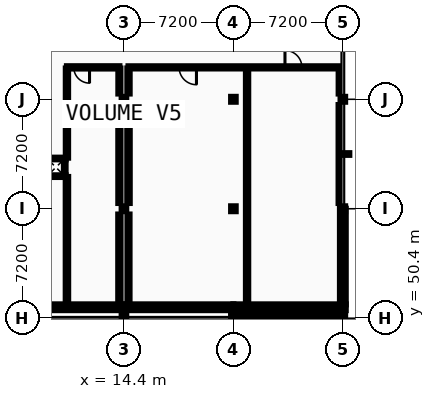
"""IFC4 building model, lengths in metres.
Left out: names, types, materials, properties, quantities, classifications, styles, units other than length and angle.
Written with IfcOpenShell. Run it as: python <this file> out.ifc"""

import sys

from ifc_helpers import new_model, si_unit, direction, frame, frame_2d, origin, origin_2d, place, context, subcontext, project, spatial, rectangle, i_section, extrude, element, fill, save


model = new_model("IFC4")
c1 = context("Model", 3, precision=1e-05, world=origin(), true_north=direction((0.0, 1.0)))
c2 = subcontext(c1, "Body", "Model", "MODEL_VIEW")
j1 = project(units=[si_unit("LENGTHUNIT", "METRE"), si_unit("PLANEANGLEUNIT", "RADIAN")], contexts=[c1])
p1 = place(None, origin())
s1 = spatial("IfcSite", under=j1, at=p1, CompositionType="ELEMENT")
p2 = place(p1, origin())
s2 = spatial("IfcBuilding", under=s1, at=p2, CompositionType="ELEMENT")
p3 = place(p2, frame((0.0, 0.0, 9.6)))
s3 = spatial("IfcBuildingStorey", under=s2, at=p3, CompositionType="ELEMENT", Elevation=9.6)
p4 = place(p3, frame((14.4, 50.4, 0.0), z_axis=(0.0, 0.0, 1.0), x_axis=(1.0, 0.0, 0.0)))
e1 = element("IfcColumn", 1, at=p4, inside=s3, PredefinedType="COLUMN", context=c2, shape_type="SweptSolid", body=[
    extrude(i_section(OverallWidth=0.3, OverallDepth=0.36, WebThickness=0.012, FlangeThickness=0.022, FilletRadius=0.027, at=origin_2d()), origin(), (0.0, 0.0, 1.0), 4.4),
])
p5 = place(p3, frame((14.4, 51.12, 0.0), z_axis=(0.0, 0.0, 1.0), x_axis=(1.0, 0.0, 0.0)))
e2 = element("IfcColumn", 2, at=p5, inside=s3, PredefinedType="COLUMN", context=c2, shape_type="SweptSolid", body=[
    extrude(i_section(OverallWidth=0.24, OverallDepth=0.24, WebThickness=0.01, FlangeThickness=0.017, FilletRadius=0.021, at=origin_2d()), origin(), (0.0, 0.0, 1.0), 4.4),
])
for number, where, z_axis, x_axis in (
    (3, (14.4, 57.6, 0.0), (0.0, 0.0, 1.0), (1.0, 0.0, 0.0)),
    (4, (14.4, 64.8, 0.0), (0.0, 0.0, 1.0), (1.0, 0.0, 0.0)),
):
    element("IfcColumn", number, at=place(p3, frame(where, z_axis=z_axis, x_axis=x_axis)), inside=s3, PredefinedType="COLUMN", context=c2, shape_type="SweptSolid", body=[
        extrude(i_section(OverallWidth=0.3, OverallDepth=0.32, WebThickness=0.011, FlangeThickness=0.021, FilletRadius=0.027, at=origin_2d()), origin(), (0.0, 0.0, 1.0), 4.4),
    ])
p6 = place(p3, frame((21.6, 50.4, 0.0), z_axis=(0.0, 0.0, 1.0), x_axis=(1.0, 0.0, 0.0)))
e5 = element("IfcColumn", 5, at=p6, inside=s3, PredefinedType="COLUMN", context=c2, shape_type="SweptSolid", body=[
    extrude(i_section(OverallWidth=0.3, OverallDepth=0.36, WebThickness=0.012, FlangeThickness=0.022, FilletRadius=0.027, at=origin_2d()), origin(), (0.0, 0.0, 1.0), 4.4),
])
p7 = place(p3, frame((21.6, 51.12, 0.0), z_axis=(0.0, 0.0, 1.0), x_axis=(1.0, 0.0, 0.0)))
e6 = element("IfcColumn", 6, at=p7, inside=s3, PredefinedType="COLUMN", context=c2, shape_type="SweptSolid", body=[
    extrude(i_section(OverallWidth=0.24, OverallDepth=0.24, WebThickness=0.01, FlangeThickness=0.017, FilletRadius=0.021, at=origin_2d()), origin(), (0.0, 0.0, 1.0), 4.4),
])
for number, where, z_axis, x_axis in (
    (7, (21.6, 57.6, 0.0), (0.0, 0.0, 1.0), (1.0, 0.0, 0.0)),
    (8, (21.6, 64.8, 0.0), (0.0, 0.0, 1.0), (1.0, 0.0, 0.0)),
):
    element("IfcColumn", number, at=place(p3, frame(where, z_axis=z_axis, x_axis=x_axis)), inside=s3, PredefinedType="COLUMN", context=c2, shape_type="SweptSolid", body=[
        extrude(i_section(OverallWidth=0.3, OverallDepth=0.32, WebThickness=0.011, FlangeThickness=0.021, FilletRadius=0.027, at=origin_2d()), origin(), (0.0, 0.0, 1.0), 4.4),
    ])
p8 = place(p3, frame((28.8, 50.4, 0.0), z_axis=(0.0, 0.0, 1.0), x_axis=(1.0, 0.0, 0.0)))
e9 = element("IfcColumn", 9, at=p8, inside=s3, PredefinedType="COLUMN", context=c2, shape_type="SweptSolid", body=[
    extrude(i_section(OverallWidth=0.3, OverallDepth=0.36, WebThickness=0.012, FlangeThickness=0.022, FilletRadius=0.027, at=origin_2d()), origin(), (0.0, 0.0, 1.0), 4.4),
])
p9 = place(p3, frame((28.8, 51.12, 0.0), z_axis=(0.0, 0.0, 1.0), x_axis=(1.0, 0.0, 0.0)))
e10 = element("IfcColumn", 10, at=p9, inside=s3, PredefinedType="COLUMN", context=c2, shape_type="SweptSolid", body=[
    extrude(i_section(OverallWidth=0.24, OverallDepth=0.24, WebThickness=0.01, FlangeThickness=0.017, FilletRadius=0.021, at=origin_2d()), origin(), (0.0, 0.0, 1.0), 4.4),
])
for number, where, z_axis, x_axis in (
    (11, (28.8, 57.6, 0.0), (0.0, 0.0, 1.0), (1.0, 0.0, 0.0)),
    (12, (28.8, 64.8, 0.0), (0.0, 0.0, 1.0), (1.0, 0.0, 0.0)),
):
    element("IfcColumn", number, at=place(p3, frame(where, z_axis=z_axis, x_axis=x_axis)), inside=s3, PredefinedType="COLUMN", context=c2, shape_type="SweptSolid", body=[
        extrude(i_section(OverallWidth=0.3, OverallDepth=0.32, WebThickness=0.011, FlangeThickness=0.021, FilletRadius=0.027, at=origin_2d()), origin(), (0.0, 0.0, 1.0), 4.4),
    ])
p10 = place(p3, frame((28.8, 50.4, 0.0), z_axis=(0.0, 0.0, 1.0), x_axis=(-1.0, 0.0, 0.0)))
e13 = element("IfcWall", 13, at=p10, inside=s3, PredefinedType="STANDARD", context=c2, shape_type="SweptSolid", body=[
    extrude(rectangle(XDim=7.31, YDim=0.38, at=frame_2d((3.655, 0.0))), origin(), (0.0, 0.0, 1.0), 3.895),
])
p11 = place(p10, frame((1.576, 0.0, 0.95)))
e14 = element("IfcOpeningElement", 14, at=p11, cuts=e13, PredefinedType="OPENING", context=c2, shape_type="SweptSolid", body=[
    extrude(rectangle(XDim=1.234, YDim=1.296, at=frame_2d((0.617, 0.648))), frame((0.0, 0.2, 0.0), z_axis=(0.0, -1.0, 0.0), x_axis=(1.0, 0.0, 0.0)), (0.0, 0.0, 1.0), 0.4),
])
p12 = place(p3, frame((7.2, 51.12, 0.0), z_axis=(0.0, 0.0, 1.0), x_axis=(1.0, 0.0, 0.0)))
e15 = element("IfcWall", 15, at=p12, inside=s3, PredefinedType="STANDARD", context=c2, shape_type="SweptSolid", body=[
    extrude(rectangle(XDim=7.2, YDim=0.38, at=frame_2d((3.6, 0.0))), origin(), (0.0, 0.0, 1.0), 3.875),
])
p13 = place(p12, frame((4.474, 0.0, 0.95)))
e16 = element("IfcOpeningElement", 16, at=p13, cuts=e15, PredefinedType="OPENING", context=c2, shape_type="SweptSolid", body=[
    extrude(rectangle(XDim=1.132, YDim=1.26, at=frame_2d((0.566, 0.63))), frame((0.0, 0.2, 0.0), z_axis=(0.0, -1.0, 0.0), x_axis=(1.0, 0.0, 0.0)), (0.0, 0.0, 1.0), 0.4),
])
p14 = place(p3, frame((14.4, 51.12, 0.0), z_axis=(0.0, 0.0, 1.0), x_axis=(1.0, 0.0, 0.0)))
e17 = element("IfcWall", 17, at=p14, inside=s3, PredefinedType="STANDARD", context=c2, shape_type="SweptSolid", body=[
    extrude(rectangle(XDim=7.2, YDim=0.38, at=frame_2d((3.6, 0.0))), origin(), (0.0, 0.0, 1.0), 3.875),
])
p15 = place(p14, frame((1.577, 0.0, 0.95)))
e18 = element("IfcOpeningElement", 18, at=p15, cuts=e17, PredefinedType="OPENING", context=c2, shape_type="SweptSolid", body=[
    extrude(rectangle(XDim=1.166, YDim=1.26, at=frame_2d((0.583, 0.63))), frame((0.0, 0.2, 0.0), z_axis=(0.0, -1.0, 0.0), x_axis=(1.0, 0.0, 0.0)), (0.0, 0.0, 1.0), 0.4),
])
p16 = place(p3, frame((21.6, 51.12, 0.0), z_axis=(0.0, 0.0, 1.0), x_axis=(1.0, 0.0, 0.0)))
e19 = element("IfcWall", 19, at=p16, inside=s3, PredefinedType="STANDARD", context=c2, shape_type="SweptSolid", body=[
    extrude(rectangle(XDim=7.39, YDim=0.38, at=frame_2d((3.695, 0.0))), origin(), (0.0, 0.0, 1.0), 3.875),
])
p17 = place(p16, frame((1.617, 0.0, 0.95)))
e20 = element("IfcOpeningElement", 20, at=p17, cuts=e19, PredefinedType="OPENING", context=c2, shape_type="SweptSolid", body=[
    extrude(rectangle(XDim=1.2, YDim=1.26, at=frame_2d((0.6, 0.63))), frame((0.0, 0.2, 0.0), z_axis=(0.0, -1.0, 0.0), x_axis=(1.0, 0.0, 0.0)), (0.0, 0.0, 1.0), 0.4),
])
p18 = place(p16, frame((4.573, 0.0, 0.95)))
e21 = element("IfcOpeningElement", 21, at=p18, cuts=e19, PredefinedType="OPENING", context=c2, shape_type="SweptSolid", body=[
    extrude(rectangle(XDim=1.2, YDim=1.26, at=frame_2d((0.6, 0.63))), frame((0.0, 0.2, 0.0), z_axis=(0.0, -1.0, 0.0), x_axis=(1.0, 0.0, 0.0)), (0.0, 0.0, 1.0), 0.4),
])
p19 = place(p3, frame((28.8, 51.31, 0.0), z_axis=(0.0, 0.0, 1.0), x_axis=(0.0, 1.0, 0.0)))
e22 = element("IfcWall", 22, at=p19, inside=s3, PredefinedType="STANDARD", context=c2, shape_type="SweptSolid", body=[
    extrude(rectangle(XDim=6.29, YDim=0.38, at=frame_2d((3.145, 0.0))), origin(), (0.0, 0.0, 1.0), 3.865),
])
p20 = place(p19, frame((2.613, 0.0, 0.95)))
e23 = element("IfcOpeningElement", 23, at=p20, cuts=e22, PredefinedType="OPENING", context=c2, shape_type="SweptSolid", body=[
    extrude(rectangle(XDim=1.064, YDim=1.296, at=frame_2d((0.532, 0.648))), frame((0.0, 0.2, 0.0), z_axis=(0.0, -1.0, 0.0), x_axis=(1.0, 0.0, 0.0)), (0.0, 0.0, 1.0), 0.4),
])
for number, where, z_axis, x_axis in (
    (24, (9.29, 59.745, 0.0), (0.0, 0.0, 1.0), (1.0, 0.0, 0.0)),
    (25, (9.29, 60.905, 0.0), (0.0, 0.0, 1.0), (1.0, 0.0, 0.0)),
):
    element("IfcWall", number, at=place(p3, frame(where, z_axis=z_axis, x_axis=x_axis)), inside=s3, PredefinedType="PARTITIONING", context=c2, shape_type="SweptSolid", body=[
        extrude(rectangle(XDim=1.27, YDim=0.11, at=frame_2d((0.635, 0.0))), origin(), (0.0, 0.0, 1.0), 4.2),
    ])
p21 = place(p3, frame((10.505, 59.8, 0.0), z_axis=(0.0, 0.0, 1.0), x_axis=(0.0, 1.0, 0.0)))
e26 = element("IfcWall", 26, at=p21, inside=s3, PredefinedType="PARTITIONING", context=c2, shape_type="SweptSolid", body=[
    extrude(rectangle(XDim=1.05, YDim=0.11, at=frame_2d((0.525, 0.0))), origin(), (0.0, 0.0, 1.0), 4.2),
])
p22 = place(p3, frame((10.65, 66.9, 0.0), z_axis=(0.0, 0.0, 1.0), x_axis=(1.0, 0.0, 0.0)))
e27 = element("IfcWall", 27, at=p22, inside=s3, PredefinedType="PARTITIONING", context=c2, shape_type="SweptSolid", body=[
    extrude(rectangle(XDim=3.45, YDim=0.15, at=frame_2d((1.725, 0.0))), origin(), (0.0, 0.0, 1.0), 4.2),
])
p23 = place(p22, frame((0.45, 0.0, 0.0)))
e28 = element("IfcOpeningElement", 28, at=p23, cuts=e27, PredefinedType="OPENING", context=c2, shape_type="SweptSolid", body=[
    extrude(rectangle(XDim=1.036, YDim=2.152, at=frame_2d((0.518, 1.076))), frame((0.0, 0.085, 0.0), z_axis=(0.0, -1.0, 0.0), x_axis=(1.0, 0.0, 0.0)), (0.0, 0.0, 1.0), 0.17),
])
p24 = place(p3, frame((14.7, 66.9, 0.0), z_axis=(0.0, 0.0, 1.0), x_axis=(1.0, 0.0, 0.0)))
e29 = element("IfcWall", 29, at=p24, inside=s3, PredefinedType="PARTITIONING", context=c2, shape_type="SweptSolid", body=[
    extrude(rectangle(XDim=13.9, YDim=0.142, at=frame_2d((6.95, 0.0))), origin(), (0.0, 0.0, 1.0), 4.2),
])
p25 = place(p24, frame((10.293, 0.0, 0.0)))
e30 = element("IfcOpeningElement", 30, at=p25, cuts=e29, PredefinedType="OPENING", context=c2, shape_type="SweptSolid", body=[
    extrude(rectangle(XDim=1.114, YDim=2.152, at=frame_2d((0.557, 1.076))), frame((0.0, 0.081, 0.0), z_axis=(0.0, -1.0, 0.0), x_axis=(1.0, 0.0, 0.0)), (0.0, 0.0, 1.0), 0.162),
])
p26 = place(p24, frame((3.33, 0.0, 0.0)))
e31 = element("IfcOpeningElement", 31, at=p26, cuts=e29, PredefinedType="OPENING", context=c2, shape_type="SweptSolid", body=[
    extrude(rectangle(XDim=1.14, YDim=2.152, at=frame_2d((0.57, 1.076))), frame((0.0, 0.081, 0.0), z_axis=(0.0, -1.0, 0.0), x_axis=(1.0, 0.0, 0.0)), (0.0, 0.0, 1.0), 0.162),
])
p27 = place(p3, frame((10.65, 51.32, 0.0), z_axis=(0.0, 0.0, 1.0), x_axis=(0.0, 1.0, 0.0)))
e32 = element("IfcWall", 32, at=p27, inside=s3, PredefinedType="PARTITIONING", context=c2, shape_type="SweptSolid", body=[
    extrude(rectangle(XDim=8.37, YDim=0.16, at=frame_2d((4.185, 0.0))), origin(), (0.0, 0.0, 1.0), 4.2),
])
p28 = place(p3, frame((10.65, 60.96, 0.0), z_axis=(0.0, 0.0, 1.0), x_axis=(0.0, 1.0, 0.0)))
e33 = element("IfcWall", 33, at=p28, inside=s3, PredefinedType="PARTITIONING", context=c2, shape_type="SweptSolid", body=[
    extrude(rectangle(XDim=5.865, YDim=0.15, at=frame_2d((2.933, 0.0))), origin(), (0.0, 0.0, 1.0), 4.2),
])
p29 = place(p3, frame((14.1, 51.5, 0.0), z_axis=(0.0, 0.0, 1.0), x_axis=(0.0, 1.0, 0.0)))
e34 = element("IfcWall", 34, at=p29, inside=s3, PredefinedType="PARTITIONING", context=c2, shape_type="SweptSolid", body=[
    extrude(rectangle(XDim=5.72, YDim=0.15, at=frame_2d((2.86, 0.0))), origin(), (0.0, 0.0, 1.0), 3.875),
])
p30 = place(p3, frame((14.1, 57.98, 0.0), z_axis=(0.0, 0.0, 1.0), x_axis=(0.0, 1.0, 0.0)))
e35 = element("IfcWall", 35, at=p30, inside=s3, PredefinedType="PARTITIONING", context=c2, shape_type="SweptSolid", body=[
    extrude(rectangle(XDim=6.44, YDim=0.142, at=frame_2d((3.22, 0.0))), origin(), (0.0, 0.0, 1.0), 3.895),
])
p31 = place(p3, frame((14.1, 65.18, 0.0), z_axis=(0.0, 0.0, 1.0), x_axis=(0.0, 1.0, 0.0)))
e36 = element("IfcWall", 36, at=p31, inside=s3, PredefinedType="PARTITIONING", context=c2, shape_type="SweptSolid", body=[
    extrude(rectangle(XDim=1.645, YDim=0.135, at=frame_2d((0.823, 0.0))), origin(), (0.0, 0.0, 1.0), 4.2),
])
p32 = place(p3, frame((14.7, 51.5, 0.0), z_axis=(0.0, 0.0, 1.0), x_axis=(0.0, 1.0, 0.0)))
e37 = element("IfcWall", 37, at=p32, inside=s3, PredefinedType="PARTITIONING", context=c2, shape_type="SweptSolid", body=[
    extrude(rectangle(XDim=5.72, YDim=0.135, at=frame_2d((2.86, 0.0))), origin(), (0.0, 0.0, 1.0), 4.2),
])
p33 = place(p3, frame((14.7, 57.98, 0.0), z_axis=(0.0, 0.0, 1.0), x_axis=(0.0, 1.0, 0.0)))
e38 = element("IfcWall", 38, at=p33, inside=s3, PredefinedType="PARTITIONING", context=c2, shape_type="SweptSolid", body=[
    extrude(rectangle(XDim=6.44, YDim=0.16, at=frame_2d((3.22, 0.0))), origin(), (0.0, 0.0, 1.0), 3.895),
])
p34 = place(p3, frame((14.7, 65.18, 0.0), z_axis=(0.0, 0.0, 1.0), x_axis=(0.0, 1.0, 0.0)))
e39 = element("IfcWall", 39, at=p34, inside=s3, PredefinedType="PARTITIONING", context=c2, shape_type="SweptSolid", body=[
    extrude(rectangle(XDim=1.649, YDim=0.15, at=frame_2d((0.825, 0.0))), origin(), (0.0, 0.0, 1.0), 3.895),
])
p35 = place(p3, frame((22.5, 51.32, 0.0), z_axis=(0.0, 0.0, 1.0), x_axis=(0.0, 1.0, 0.0)))
e40 = element("IfcWall", 40, at=p35, inside=s3, PredefinedType="PARTITIONING", context=c2, shape_type="SweptSolid", body=[
    extrude(rectangle(XDim=15.509, YDim=0.15, at=frame_2d((7.754, 0.0))), origin(), (0.0, 0.0, 1.0), 4.2),
])
p36 = place(p3, frame((28.6, 57.98, 0.0), z_axis=(0.0, 0.0, 1.0), x_axis=(0.0, 1.0, 0.0)))
e41 = element("IfcWall", 41, at=p36, inside=s3, PredefinedType="PARTITIONING", context=c2, shape_type="SweptSolid", body=[
    extrude(rectangle(XDim=6.44, YDim=0.16, at=frame_2d((3.22, 0.0))), origin(), (0.0, 0.0, 1.0), 3.885),
])
p37 = place(p3, frame((28.6, 65.18, 0.0), z_axis=(0.0, 0.0, 1.0), x_axis=(0.0, 1.0, 0.0)))
e42 = element("IfcWall", 42, at=p37, inside=s3, PredefinedType="PARTITIONING", context=c2, shape_type="SweptSolid", body=[
    extrude(rectangle(XDim=1.649, YDim=0.15, at=frame_2d((0.825, 0.0))), origin(), (0.0, 0.0, 1.0), 3.885),
])
p38 = place(p11, origin())
e43 = element("IfcWindow", 43, at=p38, inside=s3, PartitioningType="SINGLE_PANEL", PredefinedType="WINDOW", context=c2, shape_type="SweptSolid", body=[
    extrude(rectangle(XDim=1.234, YDim=1.296, at=frame_2d((0.617, 0.648))), frame((0.0, 0.03, 0.0), z_axis=(0.0, -1.0, 0.0), x_axis=(1.0, 0.0, 0.0)), (0.0, 0.0, 1.0), 0.06),
])
fill(e14, e43)
p39 = place(p13, origin())
e44 = element("IfcWindow", 44, at=p39, inside=s3, PartitioningType="SINGLE_PANEL", PredefinedType="WINDOW", context=c2, shape_type="SweptSolid", body=[
    extrude(rectangle(XDim=1.132, YDim=1.26, at=frame_2d((0.566, 0.63))), frame((0.0, 0.03, 0.0), z_axis=(0.0, -1.0, 0.0), x_axis=(1.0, 0.0, 0.0)), (0.0, 0.0, 1.0), 0.06),
])
fill(e16, e44)
p40 = place(p15, origin())
e45 = element("IfcWindow", 45, at=p40, inside=s3, PartitioningType="SINGLE_PANEL", PredefinedType="WINDOW", context=c2, shape_type="SweptSolid", body=[
    extrude(rectangle(XDim=1.166, YDim=1.26, at=frame_2d((0.583, 0.63))), frame((0.0, 0.03, 0.0), z_axis=(0.0, -1.0, 0.0), x_axis=(1.0, 0.0, 0.0)), (0.0, 0.0, 1.0), 0.06),
])
fill(e18, e45)
p41 = place(p17, origin())
e46 = element("IfcWindow", 46, at=p41, inside=s3, PartitioningType="SINGLE_PANEL", PredefinedType="WINDOW", context=c2, shape_type="SweptSolid", body=[
    extrude(rectangle(XDim=1.2, YDim=1.26, at=frame_2d((0.6, 0.63))), frame((0.0, 0.03, 0.0), z_axis=(0.0, -1.0, 0.0), x_axis=(1.0, 0.0, 0.0)), (0.0, 0.0, 1.0), 0.06),
])
fill(e20, e46)
p42 = place(p18, origin())
e47 = element("IfcWindow", 47, at=p42, inside=s3, PartitioningType="SINGLE_PANEL", PredefinedType="WINDOW", context=c2, shape_type="SweptSolid", body=[
    extrude(rectangle(XDim=1.2, YDim=1.26, at=frame_2d((0.6, 0.63))), frame((0.0, 0.03, 0.0), z_axis=(0.0, -1.0, 0.0), x_axis=(1.0, 0.0, 0.0)), (0.0, 0.0, 1.0), 0.06),
])
fill(e21, e47)
p43 = place(p20, origin())
e48 = element("IfcWindow", 48, at=p43, inside=s3, PartitioningType="SINGLE_PANEL", PredefinedType="WINDOW", context=c2, shape_type="SweptSolid", body=[
    extrude(rectangle(XDim=1.064, YDim=1.296, at=frame_2d((0.532, 0.648))), frame((0.0, 0.03, 0.0), z_axis=(0.0, -1.0, 0.0), x_axis=(1.0, 0.0, 0.0)), (0.0, 0.0, 1.0), 0.06),
])
fill(e23, e48)
p44 = place(p23, origin())
e49 = element("IfcDoor", 49, at=p44, inside=s3, OperationType="SINGLE_SWING_RIGHT", PredefinedType="DOOR", context=c2, shape_type="SweptSolid", body=[
    extrude(rectangle(XDim=1.036, YDim=2.152, at=frame_2d((0.518, 1.076))), frame((0.0, 0.025, 0.0), z_axis=(0.0, -1.0, 0.0), x_axis=(1.0, 0.0, 0.0)), (0.0, 0.0, 1.0), 0.05),
])
fill(e28, e49)
p45 = place(p25, origin())
e50 = element("IfcDoor", 50, at=p45, inside=s3, OperationType="SINGLE_SWING_LEFT", PredefinedType="DOOR", context=c2, shape_type="SweptSolid", body=[
    extrude(rectangle(XDim=1.114, YDim=2.152, at=frame_2d((0.557, 1.076))), frame((0.0, 0.025, 0.0), z_axis=(0.0, -1.0, 0.0), x_axis=(1.0, 0.0, 0.0)), (0.0, 0.0, 1.0), 0.05),
])
fill(e30, e50)
p46 = place(p26, origin())
e51 = element("IfcDoor", 51, at=p46, inside=s3, OperationType="SINGLE_SWING_RIGHT", PredefinedType="DOOR", context=c2, shape_type="SweptSolid", body=[
    extrude(rectangle(XDim=1.14, YDim=2.152, at=frame_2d((0.57, 1.076))), frame((0.0, 0.025, 0.0), z_axis=(0.0, -1.0, 0.0), x_axis=(1.0, 0.0, 0.0)), (0.0, 0.0, 1.0), 0.05),
])
fill(e31, e51)
save(model, sys.argv[1])
